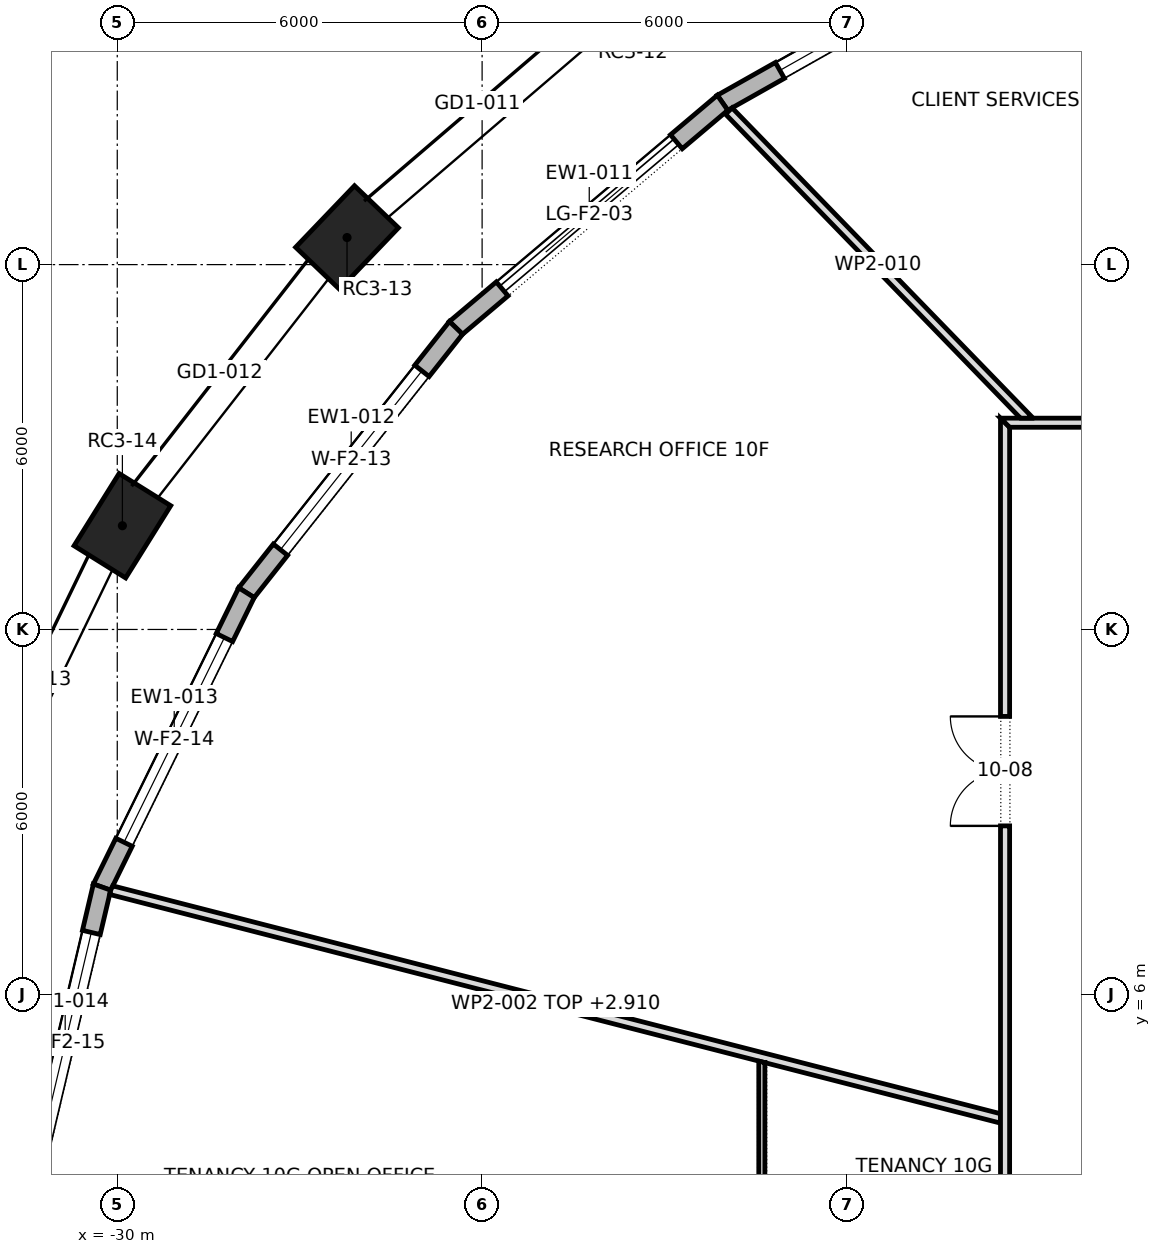
"""IFC4 building model, lengths in metres.
Left out: names, types, materials, properties, quantities, classifications, styles, units other than length and angle.
Written with IfcOpenShell. Run it as: python <this file> out.ifc"""

import sys

from ifc_helpers import new_model, si_unit, direction, frame, frame_2d, origin, origin_2d, place, context, subcontext, project, spatial, polyline, rectangle, outline, extrude, element, fill, save


model = new_model("IFC4")
c1 = context("Model", 3, precision=1e-05, world=origin(), true_north=direction((0.0, 1.0)))
c2 = subcontext(c1, "Body", "Model", "MODEL_VIEW")
j1 = project(units=[si_unit("LENGTHUNIT", "METRE"), si_unit("PLANEANGLEUNIT", "RADIAN")], contexts=[c1])
p1 = place(None, origin())
s1 = spatial("IfcSite", under=j1, at=p1, CompositionType="ELEMENT")
p2 = place(p1, origin())
s2 = spatial("IfcBuilding", under=s1, at=p2, CompositionType="ELEMENT")
p3 = place(p2, frame((0.0, 0.0, 150.7)))
s3 = spatial("IfcBuildingStorey", under=s2, at=p3, CompositionType="ELEMENT", Elevation=150.7)
for number, where, z_axis, x_axis in (
    (1, (-26.221, 18.445, 0.0), (0.0, 0.0, 1.0), (-0.692, -0.722, 0.0)),
    (2, (-29.916, 13.706, 0.0), (0.0, 0.0, 1.0), (-0.529, -0.849, 0.0)),
):
    element("IfcColumn", number, at=place(p3, frame(where, z_axis=z_axis, x_axis=x_axis)), inside=s3, PredefinedType="COLUMN", context=c2, shape_type="SweptSolid", body=[
        extrude(rectangle(XDim=1.4, YDim=1.0, at=origin_2d()), origin(), (0.0, 0.0, 1.0), 4.2),
    ])
p4 = place(p3, frame((-14.894, 23.569, 0.0), z_axis=(0.0, 0.0, 1.0), x_axis=(-0.870912346166, -0.491438384028, 0.0)))
e3 = element("IfcWall", 3, at=p4, inside=s3, PredefinedType="STANDARD", context=c2, shape_type="SweptSolid", body=[
    extrude(outline(polyline([(-0.013, -0.15), (5.93, -0.15), (5.902, 0.15), (0.013, 0.15), (-0.013, -0.15)])), origin(), (0.0, 0.0, 1.0), 3.9),
])
p5 = place(p4, frame((1.083, 0.0, 0.6)))
e4 = element("IfcOpeningElement", 4, at=p5, cuts=e3, PredefinedType="OPENING", context=c2, shape_type="SweptSolid", body=[
    extrude(rectangle(XDim=3.75, YDim=2.85, at=frame_2d((1.875, 1.425))), frame((0.0, 0.162, 0.0), z_axis=(0.0, -1.0, 0.0), x_axis=(1.0, 0.0, 0.0)), (0.0, 0.0, 1.0), 0.324),
])
p6 = place(p3, frame((-20.046, 20.661, 0.0), z_axis=(0.0, 0.0, 1.0), x_axis=(-0.764047627809, -0.64515984255, 0.0)))
e5 = element("IfcWall", 5, at=p6, inside=s3, PredefinedType="STANDARD", context=c2, shape_type="SweptSolid", body=[
    extrude(outline(polyline([(-0.014, -0.15), (5.753, -0.15), (5.722, 0.15), (0.014, 0.15), (-0.014, -0.15)])), origin(), (0.0, 0.0, 1.0), 3.9),
])
p7 = place(p6, frame((0.994, 0.0, 0.0)))
e6 = element("IfcOpeningElement", 6, at=p7, cuts=e5, PredefinedType="OPENING", context=c2, shape_type="SweptSolid", body=[
    extrude(rectangle(XDim=3.75, YDim=3.45, at=frame_2d((1.875, 1.725))), frame((0.0, 0.162, 0.0), z_axis=(0.0, -1.0, 0.0), x_axis=(1.0, 0.0, 0.0)), (0.0, 0.0, 1.0), 0.324),
])
p8 = place(p3, frame((-24.43, 16.96, 0.0), z_axis=(0.0, 0.0, 1.0), x_axis=(-0.620520511988, -0.784190215574, 0.0)))
e7 = element("IfcWall", 7, at=p8, inside=s3, PredefinedType="STANDARD", context=c2, shape_type="SweptSolid", body=[
    extrude(outline(polyline([(-0.015, -0.15), (5.57, -0.15), (5.537, 0.15), (0.015, 0.15), (-0.015, -0.15)])), origin(), (0.0, 0.0, 1.0), 3.9),
])
p9 = place(p8, frame((0.902, 0.0, 0.6)))
e8 = element("IfcOpeningElement", 8, at=p9, cuts=e7, PredefinedType="OPENING", context=c2, shape_type="SweptSolid", body=[
    extrude(rectangle(XDim=3.75, YDim=2.85, at=frame_2d((1.875, 1.425))), frame((0.0, 0.162, 0.0), z_axis=(0.0, -1.0, 0.0), x_axis=(1.0, 0.0, 0.0)), (0.0, 0.0, 1.0), 0.324),
])
p10 = place(p3, frame((-27.876, 12.605, 0.0), z_axis=(0.0, 0.0, 1.0), x_axis=(-0.440373354088, -0.897814740918, 0.0)))
e9 = element("IfcWall", 9, at=p10, inside=s3, PredefinedType="STANDARD", context=c2, shape_type="SweptSolid", body=[
    extrude(outline(polyline([(-0.016, -0.15), (5.409, -0.15), (5.376, 0.15), (0.016, 0.15), (-0.016, -0.15)])), origin(), (0.0, 0.0, 1.0), 3.9),
])
p11 = place(p10, frame((0.821, 0.0, 0.6)))
e10 = element("IfcOpeningElement", 10, at=p11, cuts=e9, PredefinedType="OPENING", context=c2, shape_type="SweptSolid", body=[
    extrude(rectangle(XDim=3.75, YDim=2.85, at=frame_2d((1.875, 1.425))), frame((0.0, 0.162, 0.0), z_axis=(0.0, -1.0, 0.0), x_axis=(1.0, 0.0, 0.0)), (0.0, 0.0, 1.0), 0.324),
])
p12 = place(p3, frame((-30.25, 7.763, 0.0), z_axis=(0.0, 0.0, 1.0), x_axis=(-0.229289208312, -0.973358340464, 0.0)))
e11 = element("IfcWall", 11, at=p12, inside=s3, PredefinedType="STANDARD", context=c2, shape_type="SweptSolid", body=[
    extrude(outline(polyline([(-0.017, -0.15), (5.3, -0.15), (5.265, 0.15), (0.017, 0.15), (-0.017, -0.15)])), origin(), (0.0, 0.0, 1.0), 3.9),
])
p13 = place(p12, frame((0.766, 0.0, 0.6)))
e12 = element("IfcOpeningElement", 12, at=p13, cuts=e11, PredefinedType="OPENING", context=c2, shape_type="SweptSolid", body=[
    extrude(rectangle(XDim=3.75, YDim=2.85, at=frame_2d((1.875, 1.425))), frame((0.0, 0.162, 0.0), z_axis=(0.0, -1.0, 0.0), x_axis=(1.0, 0.0, 0.0)), (0.0, 0.0, 1.0), 0.324),
])
p14 = place(p3, frame((-30.106, 7.715, 0.0), z_axis=(0.0, 0.0, 1.0), x_axis=(0.968604188178, -0.248607977837, 0.0)))
e13 = element("IfcWall", 13, at=p14, inside=s3, PredefinedType="PARTITIONING", context=c2, shape_type="SweptSolid", body=[
    extrude(outline(polyline([(0.0, -0.075), (1.853, -0.075), (3.707, -0.075), (5.56, -0.075), (7.413, -0.075), (9.267, -0.075), (11.12, -0.075), (11.124, -0.074), (11.124, -0.075), (12.458, -0.075), (13.791, -0.075), (15.124, -0.075), (15.124, -0.073), (15.086, 0.075), (13.202, 0.075), (11.318, 0.075), (9.434, 0.075), (7.55, 0.075), (5.667, 0.075), (3.782, 0.075), (1.898, 0.075), (0.015, 0.075), (0.0, 0.005), (0.0, -0.075)])), origin(), (0.0, 0.0, 1.0), 2.91),
])
p15 = place(p3, frame((-19.4, -1.542, 0.0), z_axis=(0.0, 0.0, 1.0), x_axis=(0.0, 1.0, 0.0)))
e14 = element("IfcWall", 14, at=p15, inside=s3, PredefinedType="PARTITIONING", context=c2, shape_type="SweptSolid", body=[
    extrude(outline(polyline([(0.008, -0.05), (1.611, -0.05), (3.213, -0.05), (4.816, -0.05), (6.418, -0.05), (6.444, 0.05), (4.833, 0.05), (3.222, 0.05), (1.611, 0.05), (0.0, 0.05), (0.0, 0.05), (0.008, -0.05)])), origin(), (0.0, 0.0, 1.0), 3.9),
])
p16 = place(p15, frame((2.772, 0.0, 0.0)))
e15 = element("IfcOpeningElement", 15, at=p16, cuts=e14, PredefinedType="OPENING", context=c2, shape_type="SweptSolid", body=[
    extrude(rectangle(XDim=0.9, YDim=2.1, at=frame_2d((0.45, 1.05))), frame((0.0, 0.062, 0.0), z_axis=(0.0, -1.0, 0.0), x_axis=(1.0, 0.0, 0.0)), (0.0, 0.0, 1.0), 0.124),
])
p17 = place(p3, frame((-15.4, -15.475, 0.0), z_axis=(0.0, 0.0, 1.0), x_axis=(0.0, 1.0, 0.0)))
e16 = element("IfcWall", 16, at=p17, inside=s3, PredefinedType="PARTITIONING", context=c2, shape_type="SweptSolid", body=[
    extrude(outline(polyline([(0.15, -0.075), (2.066, -0.075), (3.981, -0.075), (5.897, -0.075), (7.812, -0.075), (9.728, -0.075), (11.644, -0.075), (13.56, -0.075), (15.475, -0.075), (17.391, -0.075), (19.306, -0.075), (21.222, -0.075), (23.138, -0.075), (25.053, -0.075), (26.969, -0.075), (28.885, -0.075), (30.8, -0.075), (30.95, 0.075), (29.016, 0.075), (27.081, 0.075), (25.147, 0.075), (23.212, 0.075), (21.278, 0.075), (19.344, 0.075), (17.409, 0.075), (15.475, 0.075), (13.541, 0.075), (11.606, 0.075), (9.672, 0.075), (7.738, 0.075), (5.803, 0.075), (3.869, 0.075), (1.935, 0.075), (0.0, 0.075), (0.15, -0.075)])), origin(), (0.0, 0.0, 1.0), 3.9),
])
p18 = place(p17, frame((24.245, 0.0, 0.0)))
e17 = element("IfcOpeningElement", 17, at=p18, cuts=e16, PredefinedType="OPENING", context=c2, shape_type="SweptSolid", body=[
    extrude(rectangle(XDim=1.8, YDim=2.1, at=frame_2d((0.9, 1.05))), frame((0.0, 0.087, 0.0), z_axis=(0.0, -1.0, 0.0), x_axis=(1.0, 0.0, 0.0)), (0.0, 0.0, 1.0), 0.174),
])
p19 = place(p17, frame((16.305, 0.0, 0.0)))
e18 = element("IfcOpeningElement", 18, at=p19, cuts=e16, PredefinedType="OPENING", context=c2, shape_type="SweptSolid", body=[
    extrude(rectangle(XDim=1.0, YDim=2.1, at=frame_2d((0.5, 1.05))), frame((0.0, 0.087, 0.0), z_axis=(0.0, -1.0, 0.0), x_axis=(1.0, 0.0, 0.0)), (0.0, 0.0, 1.0), 0.174),
])
p20 = place(p17, frame((9.0, 0.0, 0.0)))
e19 = element("IfcOpeningElement", 19, at=p20, cuts=e16, PredefinedType="OPENING", context=c2, shape_type="SweptSolid", body=[
    extrude(rectangle(XDim=1.0, YDim=2.1, at=frame_2d((0.5, 1.05))), frame((0.0, 0.087, 0.0), z_axis=(0.0, -1.0, 0.0), x_axis=(1.0, 0.0, 0.0)), (0.0, 0.0, 1.0), 0.174),
])
p21 = place(p3, frame((-15.475, 15.4, 0.0), z_axis=(0.0, 0.0, 1.0), x_axis=(1.0, 0.0, 0.0)))
e20 = element("IfcWall", 20, at=p21, inside=s3, PredefinedType="PARTITIONING", context=c2, shape_type="SweptSolid", body=[
    extrude(outline(polyline([(0.15, -0.075), (2.066, -0.075), (3.981, -0.075), (5.897, -0.075), (7.812, -0.075), (9.728, -0.075), (11.644, -0.075), (13.56, -0.075), (15.475, -0.075), (17.391, -0.075), (19.306, -0.075), (21.222, -0.075), (23.138, -0.075), (25.053, -0.075), (26.969, -0.075), (28.885, -0.075), (30.8, -0.075), (30.95, 0.075), (29.016, 0.075), (27.081, 0.075), (25.147, 0.075), (23.212, 0.075), (21.278, 0.075), (19.344, 0.075), (17.409, 0.075), (15.475, 0.075), (13.541, 0.075), (11.606, 0.075), (9.672, 0.075), (7.738, 0.075), (5.803, 0.075), (3.869, 0.075), (1.935, 0.075), (0.0, 0.075), (0.15, -0.075)])), origin(), (0.0, 0.0, 1.0), 3.9),
])
p22 = place(p21, frame((27.55, 0.0, 0.0)))
e21 = element("IfcOpeningElement", 21, at=p22, cuts=e20, PredefinedType="OPENING", context=c2, shape_type="SweptSolid", body=[
    extrude(rectangle(XDim=1.0, YDim=2.1, at=frame_2d((0.5, 1.05))), frame((0.0, 0.087, 0.0), z_axis=(0.0, -1.0, 0.0), x_axis=(1.0, 0.0, 0.0)), (0.0, 0.0, 1.0), 0.174),
])
p23 = place(p21, frame((20.75, 0.0, 0.0)))
e22 = element("IfcOpeningElement", 22, at=p23, cuts=e20, PredefinedType="OPENING", context=c2, shape_type="SweptSolid", body=[
    extrude(rectangle(XDim=1.0, YDim=2.1, at=frame_2d((0.5, 1.05))), frame((0.0, 0.087, 0.0), z_axis=(0.0, -1.0, 0.0), x_axis=(1.0, 0.0, 0.0)), (0.0, 0.0, 1.0), 0.174),
])
p24 = place(p21, frame((13.11, 0.0, 0.0)))
e23 = element("IfcOpeningElement", 23, at=p24, cuts=e20, PredefinedType="OPENING", context=c2, shape_type="SweptSolid", body=[
    extrude(rectangle(XDim=1.0, YDim=2.1, at=frame_2d((0.5, 1.05))), frame((0.0, 0.087, 0.0), z_axis=(0.0, -1.0, 0.0), x_axis=(1.0, 0.0, 0.0)), (0.0, 0.0, 1.0), 0.174),
])
p25 = place(p21, frame((4.725, 0.0, 0.0)))
e24 = element("IfcOpeningElement", 24, at=p25, cuts=e20, PredefinedType="OPENING", context=c2, shape_type="SweptSolid", body=[
    extrude(rectangle(XDim=1.0, YDim=2.1, at=frame_2d((0.5, 1.05))), frame((0.0, 0.087, 0.0), z_axis=(0.0, -1.0, 0.0), x_axis=(1.0, 0.0, 0.0)), (0.0, 0.0, 1.0), 0.174),
])
p26 = place(p3, frame((-14.992, 15.423, 0.0), z_axis=(0.0, 0.0, 1.0), x_axis=(-0.696328171708, 0.717723538199, 0.0)))
e25 = element("IfcWall", 25, at=p26, inside=s3, PredefinedType="PARTITIONING", context=c2, shape_type="SweptSolid", body=[
    extrude(outline(polyline([(7.109, 0.075), (5.368, 0.075), (3.627, 0.075), (1.886, 0.075), (0.145, 0.075), (0.0, -0.074), (0.0, -0.075), (1.777, -0.075), (3.554, -0.075), (5.332, -0.075), (7.109, -0.075), (7.109, 0.075)])), origin(), (0.0, 0.0, 1.0), 3.9),
])
p27 = place(p5, origin())
e26 = element("IfcWindow", 26, at=p27, inside=s3, PartitioningType="TRIPLE_PANEL_VERTICAL", PredefinedType="WINDOW", context=c2, shape_type="SweptSolid", body=[
    extrude(rectangle(XDim=3.75, YDim=2.85, at=frame_2d((1.875, 1.425))), frame((0.0, 0.03, 0.0), z_axis=(0.0, -1.0, 0.0), x_axis=(1.0, 0.0, 0.0)), (0.0, 0.0, 1.0), 0.06),
])
fill(e4, e26)
p28 = place(p7, origin())
e27 = element("IfcDoor", 27, at=p28, inside=s3, OperationType="DOUBLE_DOOR_SLIDING", PredefinedType="DOOR", context=c2, shape_type="SweptSolid", body=[
    extrude(rectangle(XDim=3.75, YDim=3.45, at=frame_2d((1.875, 1.725))), frame((0.0, 0.025, 0.0), z_axis=(0.0, -1.0, 0.0), x_axis=(1.0, 0.0, 0.0)), (0.0, 0.0, 1.0), 0.05),
])
fill(e6, e27)
p29 = place(p9, origin())
e28 = element("IfcWindow", 28, at=p29, inside=s3, PartitioningType="TRIPLE_PANEL_VERTICAL", PredefinedType="WINDOW", context=c2, shape_type="SweptSolid", body=[
    extrude(rectangle(XDim=3.75, YDim=2.85, at=frame_2d((1.875, 1.425))), frame((0.0, 0.03, 0.0), z_axis=(0.0, -1.0, 0.0), x_axis=(1.0, 0.0, 0.0)), (0.0, 0.0, 1.0), 0.06),
])
fill(e8, e28)
p30 = place(p11, origin())
e29 = element("IfcWindow", 29, at=p30, inside=s3, PartitioningType="TRIPLE_PANEL_VERTICAL", PredefinedType="WINDOW", context=c2, shape_type="SweptSolid", body=[
    extrude(rectangle(XDim=3.75, YDim=2.85, at=frame_2d((1.875, 1.425))), frame((0.0, 0.03, 0.0), z_axis=(0.0, -1.0, 0.0), x_axis=(1.0, 0.0, 0.0)), (0.0, 0.0, 1.0), 0.06),
])
fill(e10, e29)
p31 = place(p13, origin())
e30 = element("IfcWindow", 30, at=p31, inside=s3, PartitioningType="TRIPLE_PANEL_VERTICAL", PredefinedType="WINDOW", context=c2, shape_type="SweptSolid", body=[
    extrude(rectangle(XDim=3.75, YDim=2.85, at=frame_2d((1.875, 1.425))), frame((0.0, 0.03, 0.0), z_axis=(0.0, -1.0, 0.0), x_axis=(1.0, 0.0, 0.0)), (0.0, 0.0, 1.0), 0.06),
])
fill(e12, e30)
p32 = place(p18, origin())
e31 = element("IfcDoor", 31, at=p32, inside=s3, OperationType="DOUBLE_DOOR_SINGLE_SWING", PredefinedType="DOOR", context=c2, shape_type="SweptSolid", body=[
    extrude(rectangle(XDim=1.8, YDim=2.1, at=frame_2d((0.9, 1.05))), frame((0.0, 0.025, 0.0), z_axis=(0.0, -1.0, 0.0), x_axis=(1.0, 0.0, 0.0)), (0.0, 0.0, 1.0), 0.05),
])
fill(e17, e31)
save(model, sys.argv[1])
